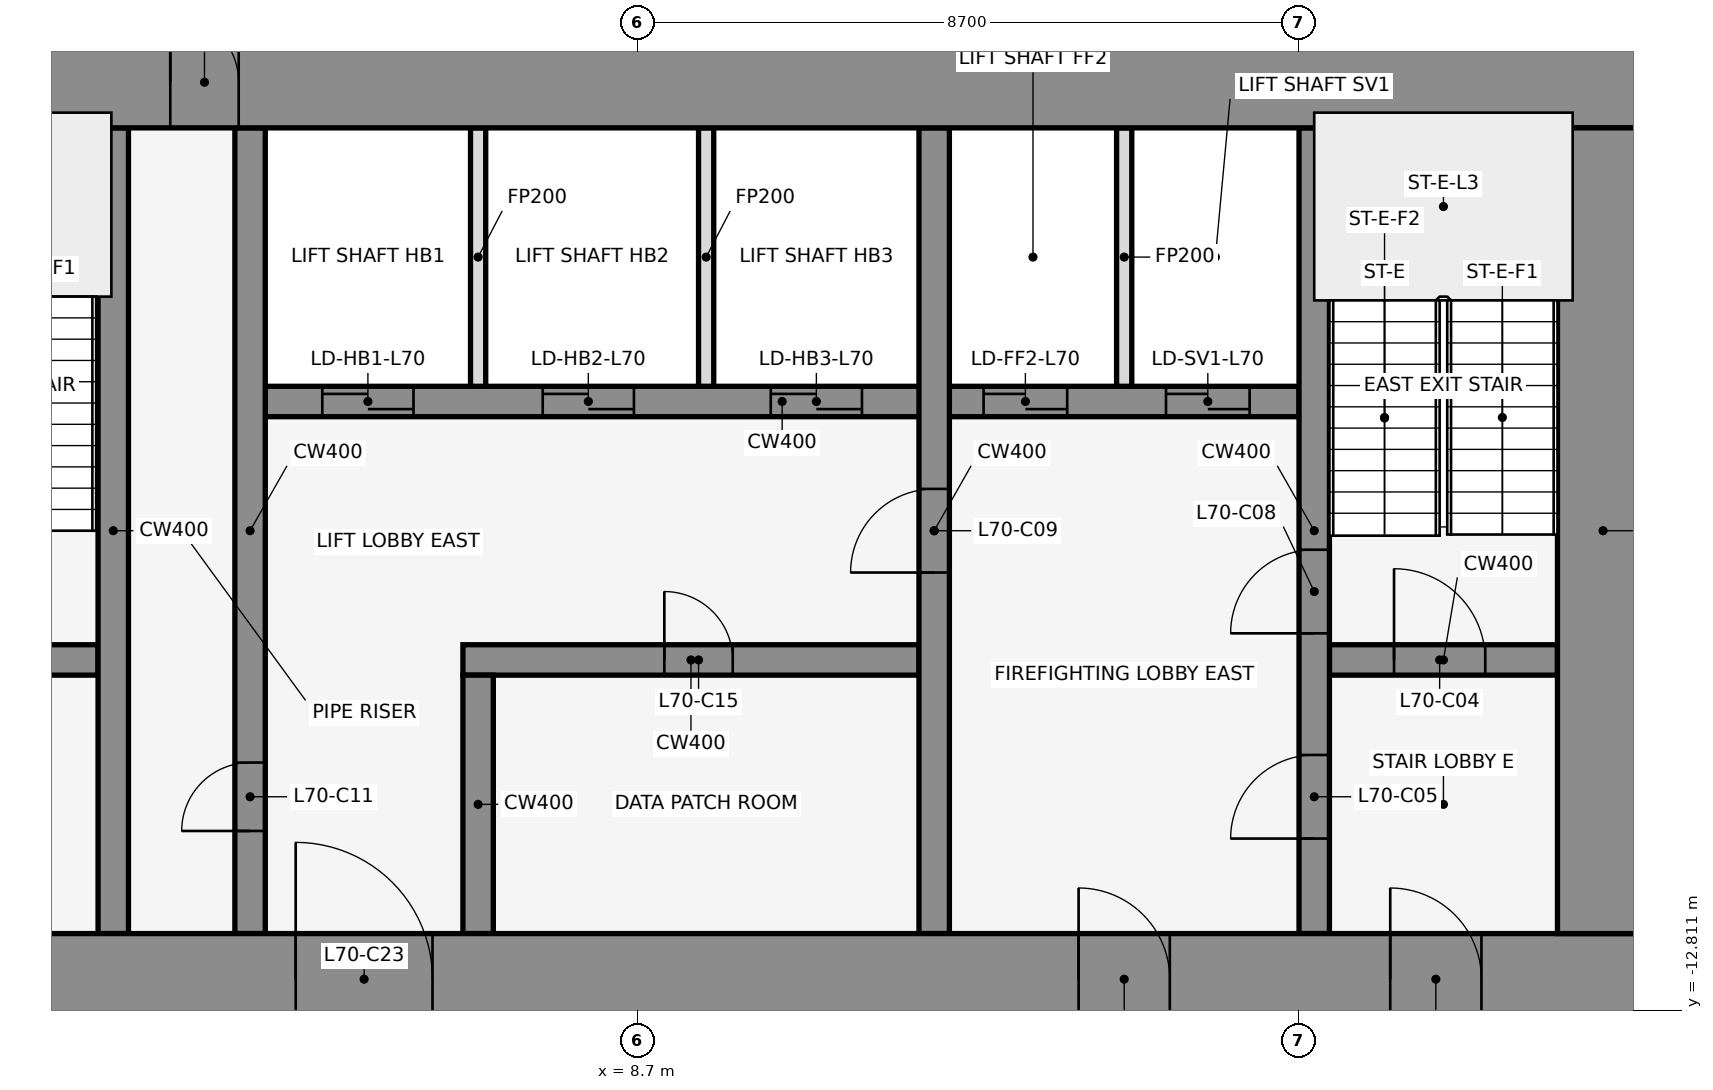
"""IFC4 building model, lengths in metres.
Left out: names, types, materials, properties, quantities, classifications, styles, units other than length and angle.
Written with IfcOpenShell. Run it as: python <this file> out.ifc"""

import sys

from ifc_helpers import new_model, si_unit, direction, frame, frame_2d, origin, place, context, subcontext, project, spatial, rectangle, extrude, element, fill, save


model = new_model("IFC4")
c1 = context("Model", 3, precision=1e-05, world=origin(), true_north=direction((0.0, 1.0)))
c2 = subcontext(c1, "Body", "Model", "MODEL_VIEW")
j1 = project(units=[si_unit("LENGTHUNIT", "METRE"), si_unit("PLANEANGLEUNIT", "RADIAN")], contexts=[c1])
p1 = place(None, origin())
s1 = spatial("IfcSite", under=j1, at=p1, CompositionType="ELEMENT")
p2 = place(p1, origin())
s2 = spatial("IfcBuilding", under=s1, at=p2, CompositionType="ELEMENT")
p3 = place(p2, frame((0.0, 0.0, 311.0)))
s3 = spatial("IfcBuildingStorey", under=s2, at=p3, CompositionType="ELEMENT", Elevation=311.0)
for number, where, z_axis, x_axis in (
    (1, (16.432, -0.105, 0.0), (0.0, 0.0, 1.0), (-0.84, 0.543, 0.0)),
    (2, (1.901, 1.08, 0.0), (0.0, 0.0, 1.0), (-0.84, -0.543, 0.0)),
):
    element("IfcWall", number, at=place(p3, frame(where, z_axis=z_axis, x_axis=x_axis)), inside=s3, PredefinedType="STANDARD", context=c2, shape_type="SweptSolid", body=[
        extrude(rectangle(XDim=2.183, YDim=0.25, at=frame_2d((1.091, 0.0))), origin(), (0.0, 0.0, 1.0), 4.35),
    ])
p4 = place(p3, frame((-1.6, -8.2, 0.0), z_axis=(0.0, 0.0, 1.0), x_axis=(1.0, 0.0, 0.0)))
e3 = element("IfcWall", 3, at=p4, inside=s3, PredefinedType="SHEAR", context=c2, shape_type="SweptSolid", body=[
    extrude(rectangle(XDim=3.2, YDim=0.4, at=frame_2d((1.6, 0.0))), origin(), (0.0, 0.0, 1.0), 4.5),
])
p5 = place(p4, frame((1.05, 0.0, 0.0)))
e4 = element("IfcOpeningElement", 4, at=p5, cuts=e3, PredefinedType="OPENING", context=c2, shape_type="SweptSolid", body=[
    extrude(rectangle(XDim=1.2, YDim=2.1, at=frame_2d((0.6, 1.05))), frame((0.0, 0.212, 0.0), z_axis=(0.0, -1.0, 0.0), x_axis=(1.0, 0.0, 0.0)), (0.0, 0.0, 1.0), 0.424),
])
p6 = place(p3, frame((6.4, -8.2, 0.0), z_axis=(0.0, 0.0, 1.0), x_axis=(1.0, 0.0, 0.0)))
e5 = element("IfcWall", 5, at=p6, inside=s3, PredefinedType="SHEAR", context=c2, shape_type="SweptSolid", body=[
    extrude(rectangle(XDim=6.0, YDim=0.4, at=frame_2d((3.0, 0.0))), origin(), (0.0, 0.0, 1.0), 4.5),
])
p7 = place(p6, frame((2.65, 0.0, 0.0)))
e6 = element("IfcOpeningElement", 6, at=p7, cuts=e5, PredefinedType="OPENING", context=c2, shape_type="SweptSolid", body=[
    extrude(rectangle(XDim=0.9, YDim=2.1, at=frame_2d((0.45, 1.05))), frame((0.0, 0.212, 0.0), z_axis=(0.0, -1.0, 0.0), x_axis=(1.0, 0.0, 0.0)), (0.0, 0.0, 1.0), 0.424),
])
p8 = place(p3, frame((17.8, -8.2, 0.0), z_axis=(0.0, 0.0, 1.0), x_axis=(1.0, 0.0, 0.0)))
e7 = element("IfcWall", 7, at=p8, inside=s3, PredefinedType="SHEAR", context=c2, shape_type="SweptSolid", body=[
    extrude(rectangle(XDim=3.0, YDim=0.4, at=frame_2d((1.5, 0.0))), origin(), (0.0, 0.0, 1.0), 4.5),
])
p9 = place(p8, frame((0.85, 0.0, 0.0)))
e8 = element("IfcOpeningElement", 8, at=p9, cuts=e7, PredefinedType="OPENING", context=c2, shape_type="SweptSolid", body=[
    extrude(rectangle(XDim=1.2, YDim=2.1, at=frame_2d((0.6, 1.05))), frame((0.0, 0.212, 0.0), z_axis=(0.0, -1.0, 0.0), x_axis=(1.0, 0.0, 0.0)), (0.0, 0.0, 1.0), 0.424),
])
p10 = place(p3, frame((3.8, -4.8, 0.0), z_axis=(0.0, 0.0, 1.0), x_axis=(1.0, 0.0, 0.0)))
e9 = element("IfcWall", 9, at=p10, inside=s3, PredefinedType="SHEAR", context=c2, shape_type="SweptSolid", body=[
    extrude(rectangle(XDim=13.6, YDim=0.4, at=frame_2d((6.8, 0.0))), origin(), (0.0, 0.0, 1.0), 4.5),
])
p11 = place(p10, frame((0.75, 0.0, 0.0)))
e10 = element("IfcOpeningElement", 10, at=p11, cuts=e9, PredefinedType="OPENING", context=c2, shape_type="SweptSolid", body=[
    extrude(rectangle(XDim=1.2, YDim=2.1, at=frame_2d((0.6, 1.05))), frame((0.0, 0.212, 0.0), z_axis=(0.0, -1.0, 0.0), x_axis=(1.0, 0.0, 0.0)), (0.0, 0.0, 1.0), 0.424),
])
p12 = place(p10, frame((3.65, 0.0, 0.0)))
e11 = element("IfcOpeningElement", 11, at=p12, cuts=e9, PredefinedType="OPENING", context=c2, shape_type="SweptSolid", body=[
    extrude(rectangle(XDim=1.2, YDim=2.1, at=frame_2d((0.6, 1.05))), frame((0.0, 0.212, 0.0), z_axis=(0.0, -1.0, 0.0), x_axis=(1.0, 0.0, 0.0)), (0.0, 0.0, 1.0), 0.424),
])
p13 = place(p10, frame((6.65, 0.0, 0.0)))
e12 = element("IfcOpeningElement", 12, at=p13, cuts=e9, PredefinedType="OPENING", context=c2, shape_type="SweptSolid", body=[
    extrude(rectangle(XDim=1.2, YDim=2.1, at=frame_2d((0.6, 1.05))), frame((0.0, 0.212, 0.0), z_axis=(0.0, -1.0, 0.0), x_axis=(1.0, 0.0, 0.0)), (0.0, 0.0, 1.0), 0.424),
])
p14 = place(p10, frame((9.45, 0.0, 0.0)))
e13 = element("IfcOpeningElement", 13, at=p14, cuts=e9, PredefinedType="OPENING", context=c2, shape_type="SweptSolid", body=[
    extrude(rectangle(XDim=1.1, YDim=2.1, at=frame_2d((0.55, 1.05))), frame((0.0, 0.212, 0.0), z_axis=(0.0, -1.0, 0.0), x_axis=(1.0, 0.0, 0.0)), (0.0, 0.0, 1.0), 0.424),
])
p15 = place(p10, frame((11.85, 0.0, 0.0)))
e14 = element("IfcOpeningElement", 14, at=p15, cuts=e9, PredefinedType="OPENING", context=c2, shape_type="SweptSolid", body=[
    extrude(rectangle(XDim=1.1, YDim=2.1, at=frame_2d((0.55, 1.05))), frame((0.0, 0.212, 0.0), z_axis=(0.0, -1.0, 0.0), x_axis=(1.0, 0.0, 0.0)), (0.0, 0.0, 1.0), 0.424),
])
p16 = place(p3, frame((1.8, -11.8, 0.0), z_axis=(0.0, 0.0, 1.0), x_axis=(0.0, 1.0, 0.0)))
e15 = element("IfcWall", 15, at=p16, inside=s3, PredefinedType="SHEAR", context=c2, shape_type="SweptSolid", body=[
    extrude(rectangle(XDim=10.6, YDim=0.4, at=frame_2d((5.3, 0.0))), origin(), (0.0, 0.0, 1.0), 4.5),
])
p17 = place(p3, frame((3.6, -11.8, 0.0), z_axis=(0.0, 0.0, 1.0), x_axis=(0.0, 1.0, 0.0)))
e16 = element("IfcWall", 16, at=p17, inside=s3, PredefinedType="SHEAR", context=c2, shape_type="SweptSolid", body=[
    extrude(rectangle(XDim=10.6, YDim=0.4, at=frame_2d((5.3, 0.0))), origin(), (0.0, 0.0, 1.0), 4.5),
])
p18 = place(p17, frame((1.35, 0.0, 0.0)))
e17 = element("IfcOpeningElement", 17, at=p18, cuts=e16, PredefinedType="OPENING", context=c2, shape_type="SweptSolid", body=[
    extrude(rectangle(XDim=0.9, YDim=2.1, at=frame_2d((0.45, 1.05))), frame((0.0, 0.212, 0.0), z_axis=(0.0, -1.0, 0.0), x_axis=(1.0, 0.0, 0.0)), (0.0, 0.0, 1.0), 0.424),
])
p19 = place(p3, frame((6.6, -11.8, 0.0), z_axis=(0.0, 0.0, 1.0), x_axis=(0.0, 1.0, 0.0)))
e18 = element("IfcWall", 18, at=p19, inside=s3, PredefinedType="SHEAR", context=c2, shape_type="SweptSolid", body=[
    extrude(rectangle(XDim=3.4, YDim=0.4, at=frame_2d((1.7, 0.0))), origin(), (0.0, 0.0, 1.0), 4.5),
])
for number, where, z_axis, x_axis in (
    (19, (6.6, -4.6, 0.0), (0.0, 0.0, 1.0), (0.0, 1.0, 0.0)),
    (20, (9.6, -4.6, 0.0), (0.0, 0.0, 1.0), (0.0, 1.0, 0.0)),
):
    element("IfcWall", number, at=place(p3, frame(where, z_axis=z_axis, x_axis=x_axis)), inside=s3, PredefinedType="PARTITIONING", context=c2, shape_type="SweptSolid", body=[
        extrude(rectangle(XDim=3.4, YDim=0.2, at=frame_2d((1.7, 0.0))), origin(), (0.0, 0.0, 1.0), 3.418),
    ])
p20 = place(p3, frame((12.6, -11.8, 0.0), z_axis=(0.0, 0.0, 1.0), x_axis=(0.0, 1.0, 0.0)))
e21 = element("IfcWall", 21, at=p20, inside=s3, PredefinedType="SHEAR", context=c2, shape_type="SweptSolid", body=[
    extrude(rectangle(XDim=10.6, YDim=0.4, at=frame_2d((5.3, 0.0))), origin(), (0.0, 0.0, 1.0), 4.5),
])
p21 = place(p20, frame((4.75, 0.0, 0.0)))
e22 = element("IfcOpeningElement", 22, at=p21, cuts=e21, PredefinedType="OPENING", context=c2, shape_type="SweptSolid", body=[
    extrude(rectangle(XDim=1.1, YDim=2.1, at=frame_2d((0.55, 1.05))), frame((0.0, 0.212, 0.0), z_axis=(0.0, -1.0, 0.0), x_axis=(1.0, 0.0, 0.0)), (0.0, 0.0, 1.0), 0.424),
])
p22 = place(p3, frame((15.1, -4.6, 0.0), z_axis=(0.0, 0.0, 1.0), x_axis=(0.0, 1.0, 0.0)))
e23 = element("IfcWall", 23, at=p22, inside=s3, PredefinedType="PARTITIONING", context=c2, shape_type="SweptSolid", body=[
    extrude(rectangle(XDim=3.4, YDim=0.2, at=frame_2d((1.7, 0.0))), origin(), (0.0, 0.0, 1.0), 3.418),
])
p23 = place(p3, frame((17.6, -11.8, 0.0), z_axis=(0.0, 0.0, 1.0), x_axis=(0.0, 1.0, 0.0)))
e24 = element("IfcWall", 24, at=p23, inside=s3, PredefinedType="SHEAR", context=c2, shape_type="SweptSolid", body=[
    extrude(rectangle(XDim=10.6, YDim=0.4, at=frame_2d((5.3, 0.0))), origin(), (0.0, 0.0, 1.0), 4.5),
])
p24 = place(p23, frame((1.25, 0.0, 0.0)))
e25 = element("IfcOpeningElement", 25, at=p24, cuts=e24, PredefinedType="OPENING", context=c2, shape_type="SweptSolid", body=[
    extrude(rectangle(XDim=1.1, YDim=2.1, at=frame_2d((0.55, 1.05))), frame((0.0, 0.212, 0.0), z_axis=(0.0, -1.0, 0.0), x_axis=(1.0, 0.0, 0.0)), (0.0, 0.0, 1.0), 0.424),
])
p25 = place(p23, frame((3.95, 0.0, 0.0)))
e26 = element("IfcOpeningElement", 26, at=p25, cuts=e24, PredefinedType="OPENING", context=c2, shape_type="SweptSolid", body=[
    extrude(rectangle(XDim=1.1, YDim=2.1, at=frame_2d((0.55, 1.05))), frame((0.0, 0.212, 0.0), z_axis=(0.0, -1.0, 0.0), x_axis=(1.0, 0.0, 0.0)), (0.0, 0.0, 1.0), 0.424),
])
p26 = place(p3, frame((-22.0, -0.6, 0.0), z_axis=(0.0, 0.0, 1.0), x_axis=(1.0, 0.0, 0.0)))
e27 = element("IfcWall", 27, at=p26, inside=s3, PredefinedType="SHEAR", context=c2, shape_type="SweptSolid", body=[
    extrude(rectangle(XDim=44.0, YDim=1.2, at=frame_2d((22.0, 0.0))), origin(), (0.0, 0.0, 1.0), 4.5),
])
p27 = place(p26, frame((18.55, 0.0, 0.0)))
e28 = element("IfcOpeningElement", 28, at=p27, cuts=e27, PredefinedType="OPENING", context=c2, shape_type="SweptSolid", body=[
    extrude(rectangle(XDim=0.9, YDim=2.1, at=frame_2d((0.45, 1.05))), frame((0.0, 0.612, 0.0), z_axis=(0.0, -1.0, 0.0), x_axis=(1.0, 0.0, 0.0)), (0.0, 0.0, 1.0), 1.224),
])
p28 = place(p26, frame((24.55, 0.0, 0.0)))
e29 = element("IfcOpeningElement", 29, at=p28, cuts=e27, PredefinedType="OPENING", context=c2, shape_type="SweptSolid", body=[
    extrude(rectangle(XDim=0.9, YDim=2.1, at=frame_2d((0.45, 1.05))), frame((0.0, 0.612, 0.0), z_axis=(0.0, -1.0, 0.0), x_axis=(1.0, 0.0, 0.0)), (0.0, 0.0, 1.0), 1.224),
])
p29 = place(p3, frame((-22.0, -12.4, 0.0), z_axis=(0.0, 0.0, 1.0), x_axis=(1.0, 0.0, 0.0)))
e30 = element("IfcWall", 30, at=p29, inside=s3, PredefinedType="SHEAR", context=c2, shape_type="SweptSolid", body=[
    extrude(rectangle(XDim=44.0, YDim=1.2, at=frame_2d((22.0, 0.0))), origin(), (0.0, 0.0, 1.0), 4.5),
])
p30 = place(p29, frame((2.2, 0.0, 0.0)))
e31 = element("IfcOpeningElement", 31, at=p30, cuts=e30, PredefinedType="OPENING", context=c2, shape_type="SweptSolid", body=[
    extrude(rectangle(XDim=1.2, YDim=2.1, at=frame_2d((0.6, 1.05))), frame((0.0, 0.612, 0.0), z_axis=(0.0, -1.0, 0.0), x_axis=(1.0, 0.0, 0.0)), (0.0, 0.0, 1.0), 1.224),
])
p31 = place(p29, frame((21.4, 0.0, 0.0)))
e32 = element("IfcOpeningElement", 32, at=p31, cuts=e30, PredefinedType="OPENING", context=c2, shape_type="SweptSolid", body=[
    extrude(rectangle(XDim=1.2, YDim=2.1, at=frame_2d((0.6, 1.05))), frame((0.0, 0.612, 0.0), z_axis=(0.0, -1.0, 0.0), x_axis=(1.0, 0.0, 0.0)), (0.0, 0.0, 1.0), 1.224),
])
p32 = place(p29, frame((40.6, 0.0, 0.0)))
e33 = element("IfcOpeningElement", 33, at=p32, cuts=e30, PredefinedType="OPENING", context=c2, shape_type="SweptSolid", body=[
    extrude(rectangle(XDim=1.2, YDim=2.1, at=frame_2d((0.6, 1.05))), frame((0.0, 0.612, 0.0), z_axis=(0.0, -1.0, 0.0), x_axis=(1.0, 0.0, 0.0)), (0.0, 0.0, 1.0), 1.224),
])
p33 = place(p29, frame((16.0, 0.0, 0.0)))
e34 = element("IfcOpeningElement", 34, at=p33, cuts=e30, PredefinedType="OPENING", context=c2, shape_type="SweptSolid", body=[
    extrude(rectangle(XDim=1.8, YDim=2.1, at=frame_2d((0.9, 1.05))), frame((0.0, 0.612, 0.0), z_axis=(0.0, -1.0, 0.0), x_axis=(1.0, 0.0, 0.0)), (0.0, 0.0, 1.0), 1.224),
])
p34 = place(p29, frame((6.3, 0.0, 0.0)))
e35 = element("IfcOpeningElement", 35, at=p34, cuts=e30, PredefinedType="OPENING", context=c2, shape_type="SweptSolid", body=[
    extrude(rectangle(XDim=1.2, YDim=2.1, at=frame_2d((0.6, 1.05))), frame((0.0, 0.612, 0.0), z_axis=(0.0, -1.0, 0.0), x_axis=(1.0, 0.0, 0.0)), (0.0, 0.0, 1.0), 1.224),
])
p35 = place(p29, frame((26.2, 0.0, 0.0)))
e36 = element("IfcOpeningElement", 36, at=p35, cuts=e30, PredefinedType="OPENING", context=c2, shape_type="SweptSolid", body=[
    extrude(rectangle(XDim=1.8, YDim=2.1, at=frame_2d((0.9, 1.05))), frame((0.0, 0.612, 0.0), z_axis=(0.0, -1.0, 0.0), x_axis=(1.0, 0.0, 0.0)), (0.0, 0.0, 1.0), 1.224),
])
p36 = place(p29, frame((36.5, 0.0, 0.0)))
e37 = element("IfcOpeningElement", 37, at=p36, cuts=e30, PredefinedType="OPENING", context=c2, shape_type="SweptSolid", body=[
    extrude(rectangle(XDim=1.2, YDim=2.1, at=frame_2d((0.6, 1.05))), frame((0.0, 0.612, 0.0), z_axis=(0.0, -1.0, 0.0), x_axis=(1.0, 0.0, 0.0)), (0.0, 0.0, 1.0), 1.224),
])
p37 = place(p3, frame((21.4, -11.8, 0.0), z_axis=(0.0, 0.0, 1.0), x_axis=(0.0, 1.0, 0.0)))
e38 = element("IfcWall", 38, at=p37, inside=s3, PredefinedType="SHEAR", context=c2, shape_type="SweptSolid", body=[
    extrude(rectangle(XDim=10.6, YDim=1.2, at=frame_2d((5.3, 0.0))), origin(), (0.0, 0.0, 1.0), 4.5),
])
p38 = place(p9, origin())
e39 = element("IfcDoor", 39, at=p38, inside=s3, OperationType="SINGLE_SWING_RIGHT", PredefinedType="DOOR", context=c2, shape_type="SweptSolid", body=[
    extrude(rectangle(XDim=1.2, YDim=2.1, at=frame_2d((0.6, 1.05))), frame((0.0, 0.025, 0.0), z_axis=(0.0, -1.0, 0.0), x_axis=(1.0, 0.0, 0.0)), (0.0, 0.0, 1.0), 0.05),
])
fill(e8, e39)
p39 = place(p24, origin())
e40 = element("IfcDoor", 40, at=p39, inside=s3, OperationType="SINGLE_SWING_LEFT", PredefinedType="DOOR", context=c2, shape_type="SweptSolid", body=[
    extrude(rectangle(XDim=1.1, YDim=2.1, at=frame_2d((0.55, 1.05))), frame((0.0, 0.025, 0.0), z_axis=(0.0, -1.0, 0.0), x_axis=(1.0, 0.0, 0.0)), (0.0, 0.0, 1.0), 0.05),
])
fill(e25, e40)
p40 = place(p11, origin())
e41 = element("IfcDoor", 41, at=p40, inside=s3, OperationType="DOUBLE_DOOR_SLIDING", PredefinedType="DOOR", context=c2, shape_type="SweptSolid", body=[
    extrude(rectangle(XDim=1.2, YDim=2.1, at=frame_2d((0.6, 1.05))), frame((0.0, 0.025, 0.0), z_axis=(0.0, -1.0, 0.0), x_axis=(1.0, 0.0, 0.0)), (0.0, 0.0, 1.0), 0.05),
])
fill(e10, e41)
p41 = place(p12, origin())
e42 = element("IfcDoor", 42, at=p41, inside=s3, OperationType="DOUBLE_DOOR_SLIDING", PredefinedType="DOOR", context=c2, shape_type="SweptSolid", body=[
    extrude(rectangle(XDim=1.2, YDim=2.1, at=frame_2d((0.6, 1.05))), frame((0.0, 0.025, 0.0), z_axis=(0.0, -1.0, 0.0), x_axis=(1.0, 0.0, 0.0)), (0.0, 0.0, 1.0), 0.05),
])
fill(e11, e42)
p42 = place(p13, origin())
e43 = element("IfcDoor", 43, at=p42, inside=s3, OperationType="DOUBLE_DOOR_SLIDING", PredefinedType="DOOR", context=c2, shape_type="SweptSolid", body=[
    extrude(rectangle(XDim=1.2, YDim=2.1, at=frame_2d((0.6, 1.05))), frame((0.0, 0.025, 0.0), z_axis=(0.0, -1.0, 0.0), x_axis=(1.0, 0.0, 0.0)), (0.0, 0.0, 1.0), 0.05),
])
fill(e12, e43)
p43 = place(p14, origin())
e44 = element("IfcDoor", 44, at=p43, inside=s3, OperationType="DOUBLE_DOOR_SLIDING", PredefinedType="DOOR", context=c2, shape_type="SweptSolid", body=[
    extrude(rectangle(XDim=1.1, YDim=2.1, at=frame_2d((0.55, 1.05))), frame((0.0, 0.025, 0.0), z_axis=(0.0, -1.0, 0.0), x_axis=(1.0, 0.0, 0.0)), (0.0, 0.0, 1.0), 0.05),
])
fill(e13, e44)
p44 = place(p15, origin())
e45 = element("IfcDoor", 45, at=p44, inside=s3, OperationType="DOUBLE_DOOR_SLIDING", PredefinedType="DOOR", context=c2, shape_type="SweptSolid", body=[
    extrude(rectangle(XDim=1.1, YDim=2.1, at=frame_2d((0.55, 1.05))), frame((0.0, 0.025, 0.0), z_axis=(0.0, -1.0, 0.0), x_axis=(1.0, 0.0, 0.0)), (0.0, 0.0, 1.0), 0.05),
])
fill(e14, e45)
p45 = place(p25, origin())
e46 = element("IfcDoor", 46, at=p45, inside=s3, OperationType="SINGLE_SWING_RIGHT", PredefinedType="DOOR", context=c2, shape_type="SweptSolid", body=[
    extrude(rectangle(XDim=1.1, YDim=2.1, at=frame_2d((0.55, 1.05))), frame((0.0, 0.025, 0.0), z_axis=(0.0, -1.0, 0.0), x_axis=(1.0, 0.0, 0.0)), (0.0, 0.0, 1.0), 0.05),
])
fill(e26, e46)
p46 = place(p21, frame((1.1, 0.0, 0.0), z_axis=(0.0, 0.0, 1.0), x_axis=(-1.0, 0.0, 0.0)))
e47 = element("IfcDoor", 47, at=p46, inside=s3, OperationType="SINGLE_SWING_RIGHT", PredefinedType="DOOR", context=c2, shape_type="SweptSolid", body=[
    extrude(rectangle(XDim=1.1, YDim=2.1, at=frame_2d((0.55, 1.05))), frame((0.0, 0.025, 0.0), z_axis=(0.0, -1.0, 0.0), x_axis=(1.0, 0.0, 0.0)), (0.0, 0.0, 1.0), 0.05),
])
fill(e22, e47)
p47 = place(p18, origin())
e48 = element("IfcDoor", 48, at=p47, inside=s3, OperationType="SINGLE_SWING_LEFT", PredefinedType="DOOR", context=c2, shape_type="SweptSolid", body=[
    extrude(rectangle(XDim=0.9, YDim=2.1, at=frame_2d((0.45, 1.05))), frame((0.0, 0.025, 0.0), z_axis=(0.0, -1.0, 0.0), x_axis=(1.0, 0.0, 0.0)), (0.0, 0.0, 1.0), 0.05),
])
fill(e17, e48)
p48 = place(p7, frame((0.9, 0.0, 0.0), z_axis=(0.0, 0.0, 1.0), x_axis=(-1.0, 0.0, 0.0)))
e49 = element("IfcDoor", 49, at=p48, inside=s3, OperationType="SINGLE_SWING_RIGHT", PredefinedType="DOOR", context=c2, shape_type="SweptSolid", body=[
    extrude(rectangle(XDim=0.9, YDim=2.1, at=frame_2d((0.45, 1.05))), frame((0.0, 0.025, 0.0), z_axis=(0.0, -1.0, 0.0), x_axis=(1.0, 0.0, 0.0)), (0.0, 0.0, 1.0), 0.05),
])
fill(e6, e49)
p49 = place(p28, origin())
e50 = element("IfcDoor", 50, at=p49, inside=s3, OperationType="SINGLE_SWING_LEFT", PredefinedType="DOOR", context=c2, shape_type="SweptSolid", body=[
    extrude(rectangle(XDim=0.9, YDim=2.1, at=frame_2d((0.45, 1.05))), frame((0.0, 0.025, 0.0), z_axis=(0.0, -1.0, 0.0), x_axis=(1.0, 0.0, 0.0)), (0.0, 0.0, 1.0), 0.05),
])
fill(e29, e50)
p50 = place(p32, frame((1.2, 0.0, 0.0), z_axis=(0.0, 0.0, 1.0), x_axis=(-1.0, 0.0, 0.0)))
e51 = element("IfcDoor", 51, at=p50, inside=s3, OperationType="SINGLE_SWING_RIGHT", PredefinedType="DOOR", context=c2, shape_type="SweptSolid", body=[
    extrude(rectangle(XDim=1.2, YDim=2.1, at=frame_2d((0.6, 1.05))), frame((0.0, 0.025, 0.0), z_axis=(0.0, -1.0, 0.0), x_axis=(1.0, 0.0, 0.0)), (0.0, 0.0, 1.0), 0.05),
])
fill(e33, e51)
p51 = place(p35, origin())
e52 = element("IfcDoor", 52, at=p51, inside=s3, OperationType="SINGLE_SWING_LEFT", PredefinedType="DOOR", context=c2, shape_type="SweptSolid", body=[
    extrude(rectangle(XDim=1.8, YDim=2.1, at=frame_2d((0.9, 1.05))), frame((0.0, 0.025, 0.0), z_axis=(0.0, -1.0, 0.0), x_axis=(1.0, 0.0, 0.0)), (0.0, 0.0, 1.0), 0.05),
])
fill(e36, e52)
p52 = place(p36, frame((1.2, 0.0, 0.0), z_axis=(0.0, 0.0, 1.0), x_axis=(-1.0, 0.0, 0.0)))
e53 = element("IfcDoor", 53, at=p52, inside=s3, OperationType="SINGLE_SWING_RIGHT", PredefinedType="DOOR", context=c2, shape_type="SweptSolid", body=[
    extrude(rectangle(XDim=1.2, YDim=2.1, at=frame_2d((0.6, 1.05))), frame((0.0, 0.025, 0.0), z_axis=(0.0, -1.0, 0.0), x_axis=(1.0, 0.0, 0.0)), (0.0, 0.0, 1.0), 0.05),
])
fill(e37, e53)
save(model, sys.argv[1])
